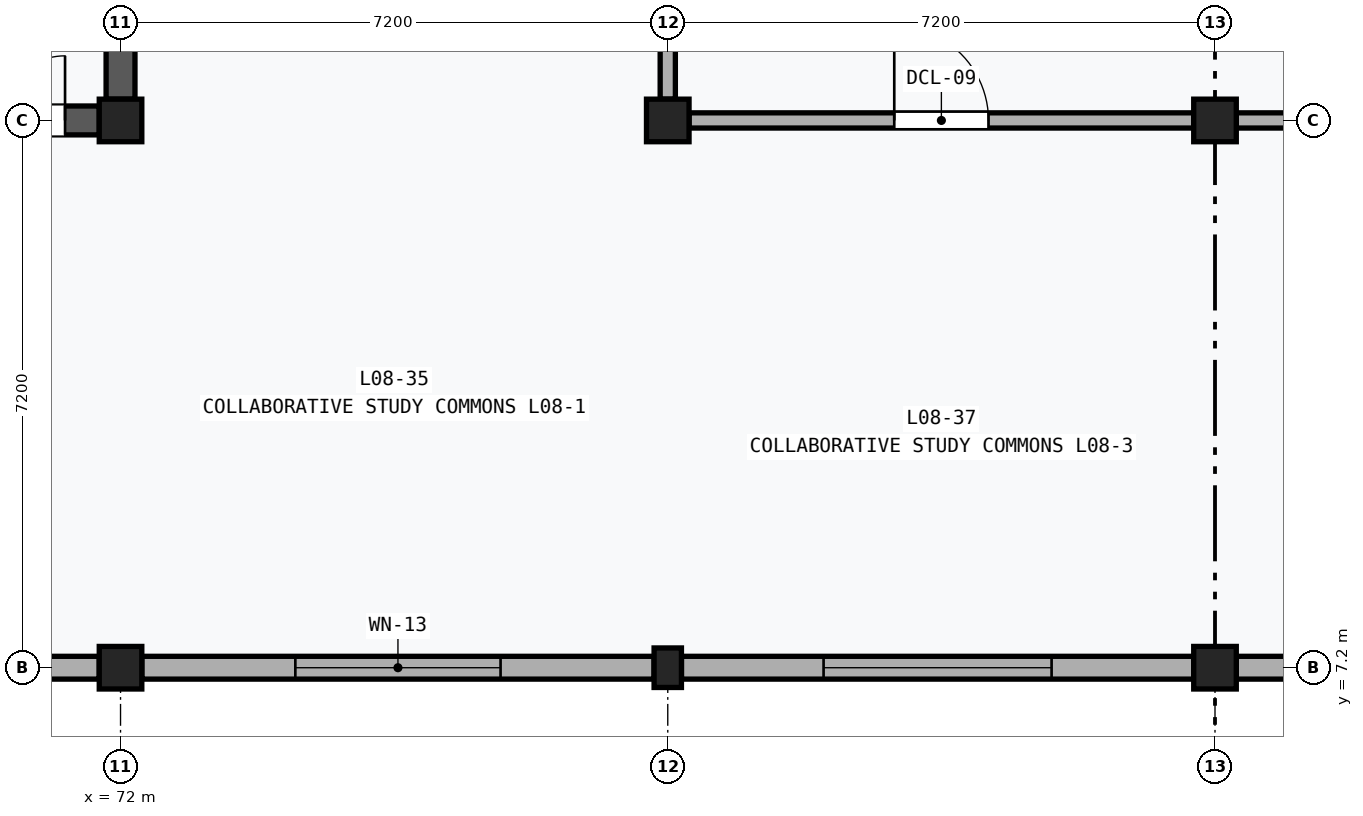
"""IFC4 building model, lengths in metres.
Left out: names, types, materials, properties, quantities, classifications, styles, units other than length and angle.
Written with IfcOpenShell. Run it as: python <this file> out.ifc"""

import sys

from ifc_helpers import new_model, si_unit, direction, frame, frame_2d, origin, origin_2d, place, context, subcontext, project, spatial, rectangle, extrude, element, fill, save


model = new_model("IFC4")
c1 = context("Model", 3, precision=1e-05, world=origin(), true_north=direction((0.0, 1.0)))
c2 = subcontext(c1, "Body", "Model", "MODEL_VIEW")
j1 = project(units=[si_unit("LENGTHUNIT", "METRE"), si_unit("PLANEANGLEUNIT", "RADIAN")], contexts=[c1])
p1 = place(None, origin())
s1 = spatial("IfcSite", under=j1, at=p1, CompositionType="ELEMENT")
p2 = place(p1, origin())
s2 = spatial("IfcBuilding", under=s1, at=p2, CompositionType="ELEMENT")
p3 = place(p2, frame((0.0, 0.0, 34.8)))
s3 = spatial("IfcBuildingStorey", under=s2, at=p3, CompositionType="ELEMENT", Elevation=34.8)
for number, where, z_axis, x_axis in (
    (1, (72.0, 7.2, 0.0), (0.0, 0.0, 1.0), (1.0, 0.0, 0.0)),
    (2, (72.0, 14.4, 0.0), (0.0, 0.0, 1.0), (1.0, 0.0, 0.0)),
):
    element("IfcColumn", number, at=place(p3, frame(where, z_axis=z_axis, x_axis=x_axis)), inside=s3, PredefinedType="COLUMN", context=c2, shape_type="SweptSolid", body=[
        extrude(rectangle(XDim=0.56, YDim=0.56, at=origin_2d()), origin(), (0.0, 0.0, 1.0), 4.0),
    ])
p4 = place(p3, frame((79.2, 7.2, 0.0), z_axis=(0.0, 0.0, 1.0), x_axis=(1.0, 0.0, 0.0)))
e3 = element("IfcColumn", 3, at=p4, inside=s3, PredefinedType="PILASTER", context=c2, shape_type="SweptSolid", body=[
    extrude(rectangle(XDim=0.36, YDim=0.52, at=origin_2d()), origin(), (0.0, 0.0, 1.0), 4.0),
])
for number, where, z_axis, x_axis in (
    (4, (79.2, 14.4, 0.0), (0.0, 0.0, 1.0), (1.0, 0.0, 0.0)),
    (5, (86.4, 7.2, 0.0), (0.0, 0.0, 1.0), (1.0, 0.0, 0.0)),
    (6, (86.4, 14.4, 0.0), (0.0, 0.0, 1.0), (1.0, 0.0, 0.0)),
):
    element("IfcColumn", number, at=place(p3, frame(where, z_axis=z_axis, x_axis=x_axis)), inside=s3, PredefinedType="COLUMN", context=c2, shape_type="SweptSolid", body=[
        extrude(rectangle(XDim=0.56, YDim=0.56, at=origin_2d()), origin(), (0.0, 0.0, 1.0), 4.0),
    ])
p5 = place(p3, frame((65.08, 7.2, 0.0), z_axis=(0.0, 0.0, 1.0), x_axis=(1.0, 0.0, 0.0)))
e7 = element("IfcWall", 7, at=p5, inside=s3, PredefinedType="SOLIDWALL", context=c2, shape_type="SweptSolid", body=[
    extrude(rectangle(XDim=6.64, YDim=0.3, at=frame_2d((3.32, 0.0))), origin(), (0.0, 0.0, 1.0), 3.19),
])
p6 = place(p5, frame((2.12, 0.0, 0.85)))
e8 = element("IfcOpeningElement", 8, at=p6, cuts=e7, PredefinedType="OPENING", context=c2, shape_type="SweptSolid", body=[
    extrude(rectangle(XDim=2.4, YDim=2.0, at=frame_2d((1.2, 1.0))), frame((0.0, 0.162, 0.0), z_axis=(0.0, -1.0, 0.0), x_axis=(1.0, 0.0, 0.0)), (0.0, 0.0, 1.0), 0.324),
])
p7 = place(p3, frame((72.28, 7.2, 0.0), z_axis=(0.0, 0.0, 1.0), x_axis=(1.0, 0.0, 0.0)))
e9 = element("IfcWall", 9, at=p7, inside=s3, PredefinedType="SOLIDWALL", context=c2, shape_type="SweptSolid", body=[
    extrude(rectangle(XDim=6.74, YDim=0.3, at=frame_2d((3.37, 0.0))), origin(), (0.0, 0.0, 1.0), 3.19),
])
p8 = place(p7, frame((2.02, 0.0, 0.85)))
e10 = element("IfcOpeningElement", 10, at=p8, cuts=e9, PredefinedType="OPENING", context=c2, shape_type="SweptSolid", body=[
    extrude(rectangle(XDim=2.7, YDim=2.0, at=frame_2d((1.35, 1.0))), frame((0.0, 0.162, 0.0), z_axis=(0.0, -1.0, 0.0), x_axis=(1.0, 0.0, 0.0)), (0.0, 0.0, 1.0), 0.324),
])
p9 = place(p3, frame((79.38, 7.2, 0.0), z_axis=(0.0, 0.0, 1.0), x_axis=(1.0, 0.0, 0.0)))
e11 = element("IfcWall", 11, at=p9, inside=s3, PredefinedType="SOLIDWALL", context=c2, shape_type="SweptSolid", body=[
    extrude(rectangle(XDim=6.74, YDim=0.3, at=frame_2d((3.37, 0.0))), origin(), (0.0, 0.0, 1.0), 3.19),
])
p10 = place(p9, frame((1.87, 0.0, 0.85)))
e12 = element("IfcOpeningElement", 12, at=p10, cuts=e11, PredefinedType="OPENING", context=c2, shape_type="SweptSolid", body=[
    extrude(rectangle(XDim=3.0, YDim=2.0, at=frame_2d((1.5, 1.0))), frame((0.0, 0.162, 0.0), z_axis=(0.0, -1.0, 0.0), x_axis=(1.0, 0.0, 0.0)), (0.0, 0.0, 1.0), 0.324),
])
p11 = place(p3, frame((86.68, 7.2, 0.0), z_axis=(0.0, 0.0, 1.0), x_axis=(1.0, 0.0, 0.0)))
e13 = element("IfcWall", 13, at=p11, inside=s3, PredefinedType="SOLIDWALL", context=c2, shape_type="SweptSolid", body=[
    extrude(rectangle(XDim=6.64, YDim=0.3, at=frame_2d((3.32, 0.0))), origin(), (0.0, 0.0, 1.0), 3.19),
])
p12 = place(p11, frame((1.67, 0.0, 0.85)))
e14 = element("IfcOpeningElement", 14, at=p12, cuts=e13, PredefinedType="OPENING", context=c2, shape_type="SweptSolid", body=[
    extrude(rectangle(XDim=3.3, YDim=2.0, at=frame_2d((1.65, 1.0))), frame((0.0, 0.162, 0.0), z_axis=(0.0, -1.0, 0.0), x_axis=(1.0, 0.0, 0.0)), (0.0, 0.0, 1.0), 0.324),
])
p13 = place(p3, frame((72.0, 14.68, 0.0), z_axis=(0.0, 0.0, 1.0), x_axis=(0.0, 1.0, 0.0)))
e15 = element("IfcWall", 15, at=p13, inside=s3, PredefinedType="SHEAR", context=c2, shape_type="SweptSolid", body=[
    extrude(rectangle(XDim=6.64, YDim=0.38, at=frame_2d((3.32, 0.0))), origin(), (0.0, 0.0, 1.0), 3.03),
])
p14 = place(p13, frame((2.2, 0.0, 0.0)))
e16 = element("IfcOpeningElement", 16, at=p14, cuts=e15, PredefinedType="OPENING", context=c2, shape_type="SweptSolid", body=[
    extrude(rectangle(XDim=1.7, YDim=2.25, at=frame_2d((0.85, 1.125))), frame((0.0, 0.202, 0.0), z_axis=(0.0, -1.0, 0.0), x_axis=(1.0, 0.0, 0.0)), (0.0, 0.0, 1.0), 0.404),
])
p15 = place(p3, frame((65.08, 14.4, 0.0), z_axis=(0.0, 0.0, 1.0), x_axis=(1.0, 0.0, 0.0)))
e17 = element("IfcWall", 17, at=p15, inside=s3, PredefinedType="SHEAR", context=c2, shape_type="SweptSolid", body=[
    extrude(rectangle(XDim=6.64, YDim=0.38, at=frame_2d((3.32, 0.0))), origin(), (0.0, 0.0, 1.0), 3.03),
])
p16 = place(p15, frame((4.49, 0.0, 0.0)))
e18 = element("IfcOpeningElement", 18, at=p16, cuts=e17, PredefinedType="OPENING", context=c2, shape_type="SweptSolid", body=[
    extrude(rectangle(XDim=1.7, YDim=2.25, at=frame_2d((0.85, 1.125))), frame((0.0, 0.202, 0.0), z_axis=(0.0, -1.0, 0.0), x_axis=(1.0, 0.0, 0.0)), (0.0, 0.0, 1.0), 0.404),
])
p17 = place(p3, frame((79.48, 14.4, 0.0), z_axis=(0.0, 0.0, 1.0), x_axis=(1.0, 0.0, 0.0)))
e19 = element("IfcWall", 19, at=p17, inside=s3, PredefinedType="PARTITIONING", context=c2, shape_type="SweptSolid", body=[
    extrude(rectangle(XDim=6.64, YDim=0.2, at=frame_2d((3.32, 0.0))), origin(), (0.0, 0.0, 1.0), 3.03),
])
p18 = place(p17, frame((2.7, 0.0, 0.0)))
e20 = element("IfcOpeningElement", 20, at=p18, cuts=e19, PredefinedType="OPENING", context=c2, shape_type="SweptSolid", body=[
    extrude(rectangle(XDim=1.24, YDim=2.26, at=frame_2d((0.62, 1.13))), frame((0.0, 0.112, 0.0), z_axis=(0.0, -1.0, 0.0), x_axis=(1.0, 0.0, 0.0)), (0.0, 0.0, 1.0), 0.224),
])
for number, where, z_axis, x_axis in (
    (21, (79.2, 14.68, 0.0), (0.0, 0.0, 1.0), (0.0, 1.0, 0.0)),
    (22, (86.68, 14.4, 0.0), (0.0, 0.0, 1.0), (1.0, 0.0, 0.0)),
):
    element("IfcWall", number, at=place(p3, frame(where, z_axis=z_axis, x_axis=x_axis)), inside=s3, PredefinedType="PARTITIONING", context=c2, shape_type="SweptSolid", body=[
        extrude(rectangle(XDim=6.64, YDim=0.2, at=frame_2d((3.32, 0.0))), origin(), (0.0, 0.0, 1.0), 3.03),
    ])
p19 = place(p8, origin())
e23 = element("IfcWindow", 23, at=p19, inside=s3, PartitioningType="SINGLE_PANEL", PredefinedType="WINDOW", context=c2, shape_type="SweptSolid", body=[
    extrude(rectangle(XDim=2.7, YDim=2.0, at=frame_2d((1.35, 1.0))), frame((0.0, 0.03, 0.0), z_axis=(0.0, -1.0, 0.0), x_axis=(1.0, 0.0, 0.0)), (0.0, 0.0, 1.0), 0.06),
])
fill(e10, e23)
p20 = place(p10, origin())
e24 = element("IfcWindow", 24, at=p20, inside=s3, PartitioningType="SINGLE_PANEL", PredefinedType="WINDOW", context=c2, shape_type="SweptSolid", body=[
    extrude(rectangle(XDim=3.0, YDim=2.0, at=frame_2d((1.5, 1.0))), frame((0.0, 0.03, 0.0), z_axis=(0.0, -1.0, 0.0), x_axis=(1.0, 0.0, 0.0)), (0.0, 0.0, 1.0), 0.06),
])
fill(e12, e24)
p21 = place(p16, origin())
e25 = element("IfcDoor", 25, at=p21, inside=s3, OperationType="DOUBLE_DOOR_SINGLE_SWING", PredefinedType="DOOR", context=c2, shape_type="SweptSolid", body=[
    extrude(rectangle(XDim=1.7, YDim=2.25, at=frame_2d((0.85, 1.125))), frame((0.0, 0.025, 0.0), z_axis=(0.0, -1.0, 0.0), x_axis=(1.0, 0.0, 0.0)), (0.0, 0.0, 1.0), 0.05),
])
fill(e18, e25)
p22 = place(p18, origin())
e26 = element("IfcDoor", 26, at=p22, inside=s3, OperationType="SINGLE_SWING_LEFT", PredefinedType="DOOR", context=c2, shape_type="SweptSolid", body=[
    extrude(rectangle(XDim=1.24, YDim=2.26, at=frame_2d((0.62, 1.13))), frame((0.0, 0.025, 0.0), z_axis=(0.0, -1.0, 0.0), x_axis=(1.0, 0.0, 0.0)), (0.0, 0.0, 1.0), 0.05),
])
fill(e20, e26)
save(model, sys.argv[1])
